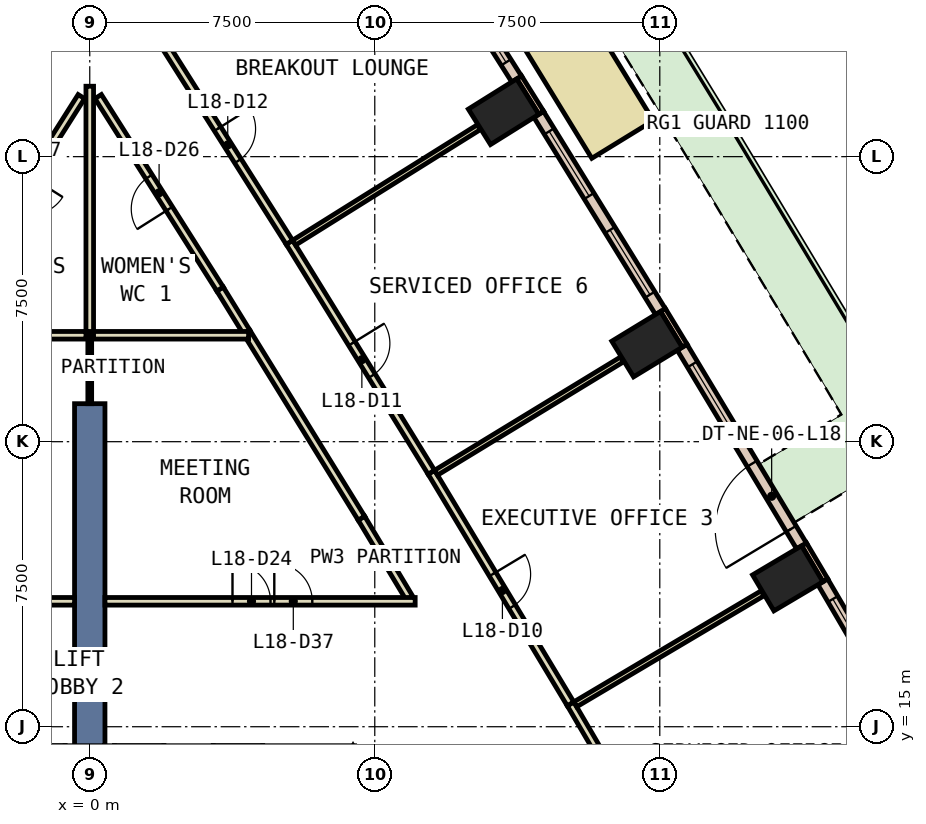
"""IFC4 building model, lengths in metres.
Left out: names, types, materials, properties, quantities, classifications, styles, units other than length and angle.
Written with IfcOpenShell. Run it as: python <this file> out.ifc"""

import sys

from ifc_helpers import new_model, si_unit, direction, frame, frame_2d, origin, origin_2d, place, context, subcontext, project, spatial, rectangle, extrude, element, fill, save


model = new_model("IFC4")
c1 = context("Model", 3, precision=1e-05, world=origin(), true_north=direction((0.0, 1.0)))
c2 = subcontext(c1, "Body", "Model", "MODEL_VIEW")
j1 = project(units=[si_unit("LENGTHUNIT", "METRE"), si_unit("PLANEANGLEUNIT", "RADIAN")], contexts=[c1])
p1 = place(None, origin())
s1 = spatial("IfcSite", under=j1, at=p1, CompositionType="ELEMENT")
p2 = place(p1, origin())
s2 = spatial("IfcBuilding", under=s1, at=p2, CompositionType="ELEMENT")
p3 = place(p2, frame((0.0, 0.0, 86.6)))
s3 = spatial("IfcBuildingStorey", under=s2, at=p3, CompositionType="ELEMENT", Elevation=86.6)
for number, where, z_axis, x_axis in (
    (1, (18.367, 18.904, 0.0), (0.0, 0.0, 1.0), (-0.51, 0.86, 0.0)),
    (2, (14.664, 25.065, 0.0), (0.0, 0.0, 1.0), (-0.52, 0.854, 0.0)),
    (3, (10.89, 31.182, 0.0), (0.0, 0.0, 1.0), (-0.53, 0.848, 0.0)),
):
    element("IfcColumn", number, at=place(p3, frame(where, z_axis=z_axis, x_axis=x_axis)), inside=s3, PredefinedType="COLUMN", context=c2, shape_type="SweptSolid", body=[
        extrude(rectangle(XDim=1.1, YDim=1.5, at=origin_2d()), origin(), (0.0, 0.0, 1.0), 3.8),
    ])
p4 = place(p3, frame((0.0, 14.5, -0.6), z_axis=(0.0, 0.0, 1.0), x_axis=(0.0, 1.0, 0.0)))
e4 = element("IfcWall", 4, at=p4, inside=s3, PredefinedType="SHEAR", context=c2, shape_type="SweptSolid", body=[
    extrude(rectangle(XDim=9.0, YDim=0.8, at=frame_2d((4.5, 0.0))), origin(), (0.0, 0.0, 1.0), 4.4),
])
p5 = place(p3, frame((19.357, 18.852, 0.0), z_axis=(0.0, 0.0, 1.0), x_axis=(-0.510082245696, 0.860125631885, 0.0)))
e5 = element("IfcWall", 5, at=p5, inside=s3, PredefinedType="STANDARD", context=c2, shape_type="SweptSolid", body=[
    extrude(rectangle(XDim=1.1, YDim=0.15, at=frame_2d((0.55, 0.0))), origin(), (0.0, 0.0, 1.0), 3.8),
])
p6 = place(p3, frame((15.655, 25.024, 0.0), z_axis=(0.0, 0.0, 1.0), x_axis=(-0.51977099384, 0.854305632641, 0.0)))
e6 = element("IfcWall", 6, at=p6, inside=s3, PredefinedType="STANDARD", context=c2, shape_type="SweptSolid", body=[
    extrude(rectangle(XDim=1.101, YDim=0.15, at=frame_2d((0.55, 0.0))), origin(), (0.0, 0.0, 1.0), 3.8),
])
p7 = place(p3, frame((11.881, 31.153, 0.0), z_axis=(0.0, 0.0, 1.0), x_axis=(-0.52997899071, 0.848010771987, 0.0)))
e7 = element("IfcWall", 7, at=p7, inside=s3, PredefinedType="STANDARD", context=c2, shape_type="SweptSolid", body=[
    extrude(rectangle(XDim=1.1, YDim=0.15, at=frame_2d((0.55, 0.0))), origin(), (0.0, 0.0, 1.0), 3.8),
])
p8 = place(p3, frame((22.369, 13.549, 0.0), z_axis=(0.0, 0.0, 1.0), x_axis=(-0.504998117261, 0.863120444413, 0.0)))
e8 = element("IfcWall", 8, at=p8, inside=s3, PredefinedType="STANDARD", context=c2, shape_type="SweptSolid", body=[
    extrude(rectangle(XDim=6.099, YDim=0.3, at=frame_2d((3.049, 0.0))), origin(), (0.0, 0.0, 1.0), 3.8),
])
p9 = place(p8, frame((0.525, 0.0, 0.9)))
e9 = element("IfcOpeningElement", 9, at=p9, cuts=e8, PredefinedType="OPENING", context=c2, shape_type="SweptSolid", body=[
    extrude(rectangle(XDim=2.0, YDim=2.6, at=frame_2d((1.0, 1.3))), frame((0.0, 0.16, 0.0), z_axis=(0.0, -1.0, 0.0), x_axis=(1.0, 0.0, 0.0)), (0.0, 0.0, 1.0), 0.32),
])
p10 = place(p8, frame((3.574, 0.0, 0.9)))
e10 = element("IfcOpeningElement", 10, at=p10, cuts=e8, PredefinedType="OPENING", context=c2, shape_type="SweptSolid", body=[
    extrude(rectangle(XDim=2.0, YDim=2.6, at=frame_2d((1.0, 1.3))), frame((0.0, 0.16, 0.0), z_axis=(0.0, -1.0, 0.0), x_axis=(1.0, 0.0, 0.0)), (0.0, 0.0, 1.0), 0.32),
])
p11 = place(p3, frame((18.729, 19.757, 0.0), z_axis=(0.0, 0.0, 1.0), x_axis=(-0.515102053092, 0.857128855483, 0.0)))
e11 = element("IfcWall", 11, at=p11, inside=s3, PredefinedType="STANDARD", context=c2, shape_type="SweptSolid", body=[
    extrude(rectangle(XDim=6.098, YDim=0.3, at=frame_2d((3.049, 0.0))), origin(), (0.0, 0.0, 1.0), 3.8),
])
p12 = place(p11, frame((0.525, 0.0, 0.0)))
e12 = element("IfcOpeningElement", 12, at=p12, cuts=e11, PredefinedType="OPENING", context=c2, shape_type="SweptSolid", body=[
    extrude(rectangle(XDim=2.0, YDim=2.4, at=frame_2d((1.0, 1.2))), frame((0.0, 0.16, 0.0), z_axis=(0.0, -1.0, 0.0), x_axis=(1.0, 0.0, 0.0)), (0.0, 0.0, 1.0), 0.32),
])
p13 = place(p11, frame((3.574, 0.0, 0.9)))
e13 = element("IfcOpeningElement", 13, at=p13, cuts=e11, PredefinedType="OPENING", context=c2, shape_type="SweptSolid", body=[
    extrude(rectangle(XDim=2.0, YDim=2.6, at=frame_2d((1.0, 1.3))), frame((0.0, 0.16, 0.0), z_axis=(0.0, -1.0, 0.0), x_axis=(1.0, 0.0, 0.0)), (0.0, 0.0, 1.0), 0.32),
])
p14 = place(p3, frame((15.017, 25.922, 0.0), z_axis=(0.0, 0.0, 1.0), x_axis=(-0.525204788886, 0.850975869065, 0.0)))
e14 = element("IfcWall", 14, at=p14, inside=s3, PredefinedType="STANDARD", context=c2, shape_type="SweptSolid", body=[
    extrude(rectangle(XDim=6.099, YDim=0.3, at=frame_2d((3.049, 0.0))), origin(), (0.0, 0.0, 1.0), 3.8),
])
p15 = place(p14, frame((0.525, 0.0, 0.9)))
e15 = element("IfcOpeningElement", 15, at=p15, cuts=e14, PredefinedType="OPENING", context=c2, shape_type="SweptSolid", body=[
    extrude(rectangle(XDim=2.0, YDim=2.6, at=frame_2d((1.0, 1.3))), frame((0.0, 0.16, 0.0), z_axis=(0.0, -1.0, 0.0), x_axis=(1.0, 0.0, 0.0)), (0.0, 0.0, 1.0), 0.32),
])
p16 = place(p14, frame((3.574, 0.0, 0.9)))
e16 = element("IfcOpeningElement", 16, at=p16, cuts=e14, PredefinedType="OPENING", context=c2, shape_type="SweptSolid", body=[
    extrude(rectangle(XDim=2.0, YDim=2.6, at=frame_2d((1.0, 1.3))), frame((0.0, 0.16, 0.0), z_axis=(0.0, -1.0, 0.0), x_axis=(1.0, 0.0, 0.0)), (0.0, 0.0, 1.0), 0.32),
])
p17 = place(p3, frame((11.232, 32.043, 0.0), z_axis=(0.0, 0.0, 1.0), x_axis=(-0.534869492536, 0.84493468739, 0.0)))
e17 = element("IfcWall", 17, at=p17, inside=s3, PredefinedType="STANDARD", context=c2, shape_type="SweptSolid", body=[
    extrude(rectangle(XDim=6.076, YDim=0.3, at=frame_2d((3.038, 0.0))), origin(), (0.0, 0.0, 1.0), 3.8),
])
p18 = place(p17, frame((0.519, 0.0, 0.9)))
e18 = element("IfcOpeningElement", 18, at=p18, cuts=e17, PredefinedType="OPENING", context=c2, shape_type="SweptSolid", body=[
    extrude(rectangle(XDim=2.0, YDim=2.6, at=frame_2d((1.0, 1.3))), frame((0.0, 0.16, 0.0), z_axis=(0.0, -1.0, 0.0), x_axis=(1.0, 0.0, 0.0)), (0.0, 0.0, 1.0), 0.32),
])
p19 = place(p17, frame((3.557, 0.0, 0.9)))
e19 = element("IfcOpeningElement", 19, at=p19, cuts=e17, PredefinedType="OPENING", context=c2, shape_type="SweptSolid", body=[
    extrude(rectangle(XDim=2.0, YDim=2.6, at=frame_2d((1.0, 1.3))), frame((0.0, 0.16, 0.0), z_axis=(0.0, -1.0, 0.0), x_axis=(1.0, 0.0, 0.0)), (0.0, 0.0, 1.0), 0.32),
])
p20 = place(p3, frame((14.021, 30.453, 0.0), z_axis=(0.0, 0.0, 1.0), x_axis=(-0.522743786252, 0.852489843889, 0.0)))
e20 = element("IfcWall", 20, at=p20, inside=s3, PredefinedType="STANDARD", context=c2, shape_type="SweptSolid", body=[
    extrude(rectangle(XDim=5.135, YDim=1.9, at=frame_2d((2.567, 0.0))), origin(), (0.0, 0.0, 1.0), 0.8),
])
p21 = place(p3, frame((8.411, 18.386, 0.0), z_axis=(0.0, 0.0, 1.0), x_axis=(-0.515008089027, 0.857185317325, 0.0)))
e21 = element("IfcWall", 21, at=p21, inside=s3, PredefinedType="PARTITIONING", context=c2, shape_type="SweptSolid", body=[
    extrude(rectangle(XDim=2.452, YDim=0.2, at=frame_2d((1.226, 0.0))), origin(), (0.0, 0.0, 1.0), 3.8),
])
p22 = place(p3, frame((7.148, 20.488, 0.0), z_axis=(0.0, 0.0, 1.0), x_axis=(-0.525162244663, 0.851002125016, 0.0)))
e22 = element("IfcWall", 22, at=p22, inside=s3, PredefinedType="PARTITIONING", context=c2, shape_type="SweptSolid", body=[
    extrude(rectangle(XDim=5.754, YDim=0.2, at=frame_2d((2.877, 0.0))), origin(), (0.0, 0.0, 1.0), 3.8),
])
p23 = place(p3, frame((4.126, 25.385, 0.0), z_axis=(0.0, 0.0, 1.0), x_axis=(-0.524824420869, 0.851210507019, 0.0)))
e23 = element("IfcWall", 23, at=p23, inside=s3, PredefinedType="PARTITIONING", context=c2, shape_type="SweptSolid", body=[
    extrude(rectangle(XDim=1.33, YDim=0.2, at=frame_2d((0.665, 0.0))), origin(), (0.0, 0.0, 1.0), 3.8),
])
p24 = place(p3, frame((3.428, 26.517, 0.0), z_axis=(0.0, 0.0, 1.0), x_axis=(-0.535034639024, 0.844830122003, 0.0)))
e24 = element("IfcWall", 24, at=p24, inside=s3, PredefinedType="PARTITIONING", context=c2, shape_type="SweptSolid", body=[
    extrude(rectangle(XDim=5.994, YDim=0.2, at=frame_2d((2.997, 0.0))), origin(), (0.0, 0.0, 1.0), 3.8),
])
p25 = place(p24, frame((2.497, 0.0, 0.0)))
e25 = element("IfcOpeningElement", 25, at=p25, cuts=e24, PredefinedType="OPENING", context=c2, shape_type="SweptSolid", body=[
    extrude(rectangle(XDim=1.0, YDim=2.1, at=frame_2d((0.5, 1.05))), frame((0.0, 0.11, 0.0), z_axis=(0.0, -1.0, 0.0), x_axis=(1.0, 0.0, 0.0)), (0.0, 0.0, 1.0), 0.22),
])
p26 = place(p3, frame((-0.221, 31.581, 0.0), z_axis=(0.0, 0.0, 1.0), x_axis=(-0.535034639024, -0.844830122003, 0.0)))
e26 = element("IfcWall", 26, at=p26, inside=s3, PredefinedType="PARTITIONING", context=c2, shape_type="SweptSolid", body=[
    extrude(rectangle(XDim=5.994, YDim=0.2, at=frame_2d((2.997, 0.0))), origin(), (0.0, 0.0, 1.0), 3.8),
])
p27 = place(p26, frame((2.497, 0.0, 0.0)))
e27 = element("IfcOpeningElement", 27, at=p27, cuts=e26, PredefinedType="OPENING", context=c2, shape_type="SweptSolid", body=[
    extrude(rectangle(XDim=1.0, YDim=2.1, at=frame_2d((0.5, 1.05))), frame((0.0, 0.11, 0.0), z_axis=(0.0, -1.0, 0.0), x_axis=(1.0, 0.0, 0.0)), (0.0, 0.0, 1.0), 0.22),
])
p28 = place(p3, frame((12.652, 15.602, 0.0), z_axis=(0.0, 0.0, 1.0), x_axis=(0.504914693075, -0.863169249172, 0.0)))
e28 = element("IfcWall", 28, at=p28, inside=s3, PredefinedType="PARTITIONING", context=c2, shape_type="SweptSolid", body=[
    extrude(rectangle(XDim=7.11, YDim=0.2, at=frame_2d((3.555, 0.0))), origin(), (0.0, 0.0, 1.0), 3.8),
])
p29 = place(p28, frame((3.13, 0.0, 0.0)))
e29 = element("IfcOpeningElement", 29, at=p29, cuts=e28, PredefinedType="OPENING", context=c2, shape_type="SweptSolid", body=[
    extrude(rectangle(XDim=1.0, YDim=2.1, at=frame_2d((0.5, 1.05))), frame((0.0, 0.11, 0.0), z_axis=(0.0, -1.0, 0.0), x_axis=(1.0, 0.0, 0.0)), (0.0, 0.0, 1.0), 0.22),
])
p30 = place(p3, frame((8.989, 21.696, 0.0), z_axis=(0.0, 0.0, 1.0), x_axis=(0.515000602442, -0.857189815318, 0.0)))
e30 = element("IfcWall", 30, at=p30, inside=s3, PredefinedType="PARTITIONING", context=c2, shape_type="SweptSolid", body=[
    extrude(rectangle(XDim=7.11, YDim=0.2, at=frame_2d((3.555, 0.0))), origin(), (0.0, 0.0, 1.0), 3.8),
])
p31 = place(p30, frame((3.13, 0.0, 0.0)))
e31 = element("IfcOpeningElement", 31, at=p31, cuts=e30, PredefinedType="OPENING", context=c2, shape_type="SweptSolid", body=[
    extrude(rectangle(XDim=1.0, YDim=2.1, at=frame_2d((0.5, 1.05))), frame((0.0, 0.11, 0.0), z_axis=(0.0, -1.0, 0.0), x_axis=(1.0, 0.0, 0.0)), (0.0, 0.0, 1.0), 0.22),
])
p32 = place(p3, frame((5.254, 27.747, 0.0), z_axis=(0.0, 0.0, 1.0), x_axis=(0.52516023635, -0.851003364363, 0.0)))
e32 = element("IfcWall", 32, at=p32, inside=s3, PredefinedType="PARTITIONING", context=c2, shape_type="SweptSolid", body=[
    extrude(rectangle(XDim=7.11, YDim=0.2, at=frame_2d((3.555, 0.0))), origin(), (0.0, 0.0, 1.0), 3.8),
])
p33 = place(p32, frame((3.13, 0.0, 0.0)))
e33 = element("IfcOpeningElement", 33, at=p33, cuts=e32, PredefinedType="OPENING", context=c2, shape_type="SweptSolid", body=[
    extrude(rectangle(XDim=1.0, YDim=2.1, at=frame_2d((0.5, 1.05))), frame((0.0, 0.11, 0.0), z_axis=(0.0, -1.0, 0.0), x_axis=(1.0, 0.0, 0.0)), (0.0, 0.0, 1.0), 0.22),
])
p34 = place(p3, frame((1.929, 32.997, 0.0), z_axis=(0.0, 0.0, 1.0), x_axis=(0.534863276222, -0.844938622474, 0.0)))
e34 = element("IfcWall", 34, at=p34, inside=s3, PredefinedType="PARTITIONING", context=c2, shape_type="SweptSolid", body=[
    extrude(rectangle(XDim=6.215, YDim=0.2, at=frame_2d((3.107, 0.0))), origin(), (0.0, 0.0, 1.0), 3.8),
])
p35 = place(p34, frame((2.682, 0.0, 0.0)))
e35 = element("IfcOpeningElement", 35, at=p35, cuts=e34, PredefinedType="OPENING", context=c2, shape_type="SweptSolid", body=[
    extrude(rectangle(XDim=1.0, YDim=2.1, at=frame_2d((0.5, 1.05))), frame((0.0, 0.11, 0.0), z_axis=(0.0, -1.0, 0.0), x_axis=(1.0, 0.0, 0.0)), (0.0, 0.0, 1.0), 0.22),
])
p36 = place(p3, frame((0.4, 18.3, 0.0), z_axis=(0.0, 0.0, 1.0), x_axis=(1.0, 0.0, 0.0)))
e36 = element("IfcWall", 36, at=p36, inside=s3, PredefinedType="PARTITIONING", context=c2, shape_type="SweptSolid", body=[
    extrude(rectangle(XDim=8.163, YDim=0.2, at=frame_2d((4.082, 0.0))), origin(), (0.0, 0.0, 1.0), 3.8),
])
p37 = place(p36, frame((3.356, 0.0, 0.0)))
e37 = element("IfcOpeningElement", 37, at=p37, cuts=e36, PredefinedType="OPENING", context=c2, shape_type="SweptSolid", body=[
    extrude(rectangle(XDim=1.0, YDim=2.1, at=frame_2d((0.5, 1.05))), frame((0.0, 0.11, 0.0), z_axis=(0.0, -1.0, 0.0), x_axis=(1.0, 0.0, 0.0)), (0.0, 0.0, 1.0), 0.22),
])
p38 = place(p36, frame((4.456, 0.0, 0.0)))
e38 = element("IfcOpeningElement", 38, at=p38, cuts=e36, PredefinedType="OPENING", context=c2, shape_type="SweptSolid", body=[
    extrude(rectangle(XDim=1.0, YDim=2.1, at=frame_2d((0.5, 1.05))), frame((0.0, 0.11, 0.0), z_axis=(0.0, -1.0, 0.0), x_axis=(1.0, 0.0, 0.0)), (0.0, 0.0, 1.0), 0.22),
])
p39 = place(p3, frame((-8.563, 18.3, 0.0), z_axis=(0.0, 0.0, 1.0), x_axis=(1.0, 0.0, 0.0)))
e39 = element("IfcWall", 39, at=p39, inside=s3, PredefinedType="PARTITIONING", context=c2, shape_type="SweptSolid", body=[
    extrude(rectangle(XDim=8.163, YDim=0.2, at=frame_2d((4.082, 0.0))), origin(), (0.0, 0.0, 1.0), 3.8),
])
p40 = place(p39, frame((3.806, 0.0, 0.0)))
e40 = element("IfcOpeningElement", 40, at=p40, cuts=e39, PredefinedType="OPENING", context=c2, shape_type="SweptSolid", body=[
    extrude(rectangle(XDim=1.0, YDim=2.1, at=frame_2d((0.5, 1.05))), frame((0.0, 0.11, 0.0), z_axis=(0.0, -1.0, 0.0), x_axis=(1.0, 0.0, 0.0)), (0.0, 0.0, 1.0), 0.22),
])
p41 = place(p39, frame((4.906, 0.0, 0.0)))
e41 = element("IfcOpeningElement", 41, at=p41, cuts=e39, PredefinedType="OPENING", context=c2, shape_type="SweptSolid", body=[
    extrude(rectangle(XDim=1.0, YDim=2.1, at=frame_2d((0.5, 1.05))), frame((0.0, 0.11, 0.0), z_axis=(0.0, -1.0, 0.0), x_axis=(1.0, 0.0, 0.0)), (0.0, 0.0, 1.0), 0.22),
])
p42 = place(p3, frame((0.0, 23.5, 0.0), z_axis=(0.0, 0.0, 1.0), x_axis=(0.0, 1.0, 0.0)))
e42 = element("IfcWall", 42, at=p42, inside=s3, PredefinedType="PARTITIONING", context=c2, shape_type="SweptSolid", body=[
    extrude(rectangle(XDim=1.9, YDim=0.1, at=frame_2d((0.95, 0.0))), origin(), (0.0, 0.0, 1.0), 3.8),
])
for number, where, z_axis, x_axis in (
    (43, (0.1, 25.3, 0.0), (0.0, 0.0, 1.0), (1.0, 0.0, 0.0)),
    (44, (-4.179, 25.3, 0.0), (0.0, 0.0, 1.0), (1.0, 0.0, 0.0)),
):
    element("IfcWall", number, at=place(p3, frame(where, z_axis=z_axis, x_axis=x_axis)), inside=s3, PredefinedType="PARTITIONING", context=c2, shape_type="SweptSolid", body=[
        extrude(rectangle(XDim=4.079, YDim=0.2, at=frame_2d((2.04, 0.0))), origin(), (0.0, 0.0, 1.0), 3.8),
    ])
p43 = place(p3, frame((0.0, 25.4, 0.0), z_axis=(0.0, 0.0, 1.0), x_axis=(0.0, 1.0, 0.0)))
e45 = element("IfcWall", 45, at=p43, inside=s3, PredefinedType="PARTITIONING", context=c2, shape_type="SweptSolid", body=[
    extrude(rectangle(XDim=6.453, YDim=0.2, at=frame_2d((3.227, 0.0))), origin(), (0.0, 0.0, 1.0), 3.8),
])
p44 = place(p3, frame((12.776, 15.589, 0.0), z_axis=(0.0, 0.0, 1.0), x_axis=(0.860225086153, 0.509914503768, 0.0)))
e46 = element("IfcWall", 46, at=p44, inside=s3, PredefinedType="PARTITIONING", context=c2, shape_type="SweptSolid", body=[
    extrude(rectangle(XDim=5.73, YDim=0.15, at=frame_2d((2.865, 0.0))), origin(), (0.0, 0.0, 1.0), 3.8),
])
p45 = place(p3, frame((9.113, 21.684, 0.0), z_axis=(0.0, 0.0, 1.0), x_axis=(0.854075097122, 0.520149717367, 0.0)))
e47 = element("IfcWall", 47, at=p45, inside=s3, PredefinedType="PARTITIONING", context=c2, shape_type="SweptSolid", body=[
    extrude(rectangle(XDim=5.729, YDim=0.15, at=frame_2d((2.865, 0.0))), origin(), (0.0, 0.0, 1.0), 3.8),
])
p46 = place(p3, frame((5.378, 27.737, 0.0), z_axis=(0.0, 0.0, 1.0), x_axis=(0.848005484868, 0.529987450449, 0.0)))
e48 = element("IfcWall", 48, at=p46, inside=s3, PredefinedType="PARTITIONING", context=c2, shape_type="SweptSolid", body=[
    extrude(rectangle(XDim=5.73, YDim=0.15, at=frame_2d((2.865, 0.0))), origin(), (0.0, 0.0, 1.0), 3.8),
])
p47 = place(p10, origin())
e49 = element("IfcWindow", 49, at=p47, inside=s3, PartitioningType="SINGLE_PANEL", PredefinedType="WINDOW", context=c2, shape_type="SweptSolid", body=[
    extrude(rectangle(XDim=2.0, YDim=2.6, at=frame_2d((1.0, 1.3))), frame((0.0, 0.03, 0.0), z_axis=(0.0, -1.0, 0.0), x_axis=(1.0, 0.0, 0.0)), (0.0, 0.0, 1.0), 0.06),
])
fill(e10, e49)
p48 = place(p12, origin())
e50 = element("IfcDoor", 50, at=p48, inside=s3, OperationType="SLIDING_TO_LEFT", PredefinedType="DOOR", context=c2, shape_type="SweptSolid", body=[
    extrude(rectangle(XDim=2.0, YDim=2.4, at=frame_2d((1.0, 1.2))), frame((0.0, 0.025, 0.0), z_axis=(0.0, -1.0, 0.0), x_axis=(1.0, 0.0, 0.0)), (0.0, 0.0, 1.0), 0.05),
])
fill(e12, e50)
p49 = place(p13, origin())
e51 = element("IfcWindow", 51, at=p49, inside=s3, PartitioningType="SINGLE_PANEL", PredefinedType="WINDOW", context=c2, shape_type="SweptSolid", body=[
    extrude(rectangle(XDim=2.0, YDim=2.6, at=frame_2d((1.0, 1.3))), frame((0.0, 0.03, 0.0), z_axis=(0.0, -1.0, 0.0), x_axis=(1.0, 0.0, 0.0)), (0.0, 0.0, 1.0), 0.06),
])
fill(e13, e51)
p50 = place(p15, origin())
e52 = element("IfcWindow", 52, at=p50, inside=s3, PartitioningType="SINGLE_PANEL", PredefinedType="WINDOW", context=c2, shape_type="SweptSolid", body=[
    extrude(rectangle(XDim=2.0, YDim=2.6, at=frame_2d((1.0, 1.3))), frame((0.0, 0.03, 0.0), z_axis=(0.0, -1.0, 0.0), x_axis=(1.0, 0.0, 0.0)), (0.0, 0.0, 1.0), 0.06),
])
fill(e15, e52)
p51 = place(p16, origin())
e53 = element("IfcWindow", 53, at=p51, inside=s3, PartitioningType="SINGLE_PANEL", PredefinedType="WINDOW", context=c2, shape_type="SweptSolid", body=[
    extrude(rectangle(XDim=2.0, YDim=2.6, at=frame_2d((1.0, 1.3))), frame((0.0, 0.03, 0.0), z_axis=(0.0, -1.0, 0.0), x_axis=(1.0, 0.0, 0.0)), (0.0, 0.0, 1.0), 0.06),
])
fill(e16, e53)
p52 = place(p18, origin())
e54 = element("IfcWindow", 54, at=p52, inside=s3, PartitioningType="SINGLE_PANEL", PredefinedType="WINDOW", context=c2, shape_type="SweptSolid", body=[
    extrude(rectangle(XDim=2.0, YDim=2.6, at=frame_2d((1.0, 1.3))), frame((0.0, 0.03, 0.0), z_axis=(0.0, -1.0, 0.0), x_axis=(1.0, 0.0, 0.0)), (0.0, 0.0, 1.0), 0.06),
])
fill(e18, e54)
p53 = place(p31, origin())
e55 = element("IfcDoor", 55, at=p53, inside=s3, OperationType="SINGLE_SWING_LEFT", PredefinedType="DOOR", context=c2, shape_type="SweptSolid", body=[
    extrude(rectangle(XDim=1.0, YDim=2.1, at=frame_2d((0.5, 1.05))), frame((0.0, 0.025, 0.0), z_axis=(0.0, -1.0, 0.0), x_axis=(1.0, 0.0, 0.0)), (0.0, 0.0, 1.0), 0.05),
])
fill(e31, e55)
p54 = place(p33, origin())
e56 = element("IfcDoor", 56, at=p54, inside=s3, OperationType="SINGLE_SWING_LEFT", PredefinedType="DOOR", context=c2, shape_type="SweptSolid", body=[
    extrude(rectangle(XDim=1.0, YDim=2.1, at=frame_2d((0.5, 1.05))), frame((0.0, 0.025, 0.0), z_axis=(0.0, -1.0, 0.0), x_axis=(1.0, 0.0, 0.0)), (0.0, 0.0, 1.0), 0.05),
])
fill(e33, e56)
p55 = place(p35, origin())
e57 = element("IfcDoor", 57, at=p55, inside=s3, OperationType="SINGLE_SWING_LEFT", PredefinedType="DOOR", context=c2, shape_type="SweptSolid", body=[
    extrude(rectangle(XDim=1.0, YDim=2.1, at=frame_2d((0.5, 1.05))), frame((0.0, 0.025, 0.0), z_axis=(0.0, -1.0, 0.0), x_axis=(1.0, 0.0, 0.0)), (0.0, 0.0, 1.0), 0.05),
])
fill(e35, e57)
p56 = place(p37, origin())
e58 = element("IfcDoor", 58, at=p56, inside=s3, OperationType="SINGLE_SWING_RIGHT", PredefinedType="DOOR", context=c2, shape_type="SweptSolid", body=[
    extrude(rectangle(XDim=1.0, YDim=2.1, at=frame_2d((0.5, 1.05))), frame((0.0, 0.025, 0.0), z_axis=(0.0, -1.0, 0.0), x_axis=(1.0, 0.0, 0.0)), (0.0, 0.0, 1.0), 0.05),
])
fill(e37, e58)
p57 = place(p25, origin())
e59 = element("IfcDoor", 59, at=p57, inside=s3, OperationType="SINGLE_SWING_LEFT", PredefinedType="DOOR", context=c2, shape_type="SweptSolid", body=[
    extrude(rectangle(XDim=1.0, YDim=2.1, at=frame_2d((0.5, 1.05))), frame((0.0, 0.025, 0.0), z_axis=(0.0, -1.0, 0.0), x_axis=(1.0, 0.0, 0.0)), (0.0, 0.0, 1.0), 0.05),
])
fill(e25, e59)
p58 = place(p38, origin())
e60 = element("IfcDoor", 60, at=p58, inside=s3, OperationType="SINGLE_SWING_RIGHT", PredefinedType="DOOR", context=c2, shape_type="SweptSolid", body=[
    extrude(rectangle(XDim=1.0, YDim=2.1, at=frame_2d((0.5, 1.05))), frame((0.0, 0.025, 0.0), z_axis=(0.0, -1.0, 0.0), x_axis=(1.0, 0.0, 0.0)), (0.0, 0.0, 1.0), 0.05),
])
fill(e38, e60)
save(model, sys.argv[1])
